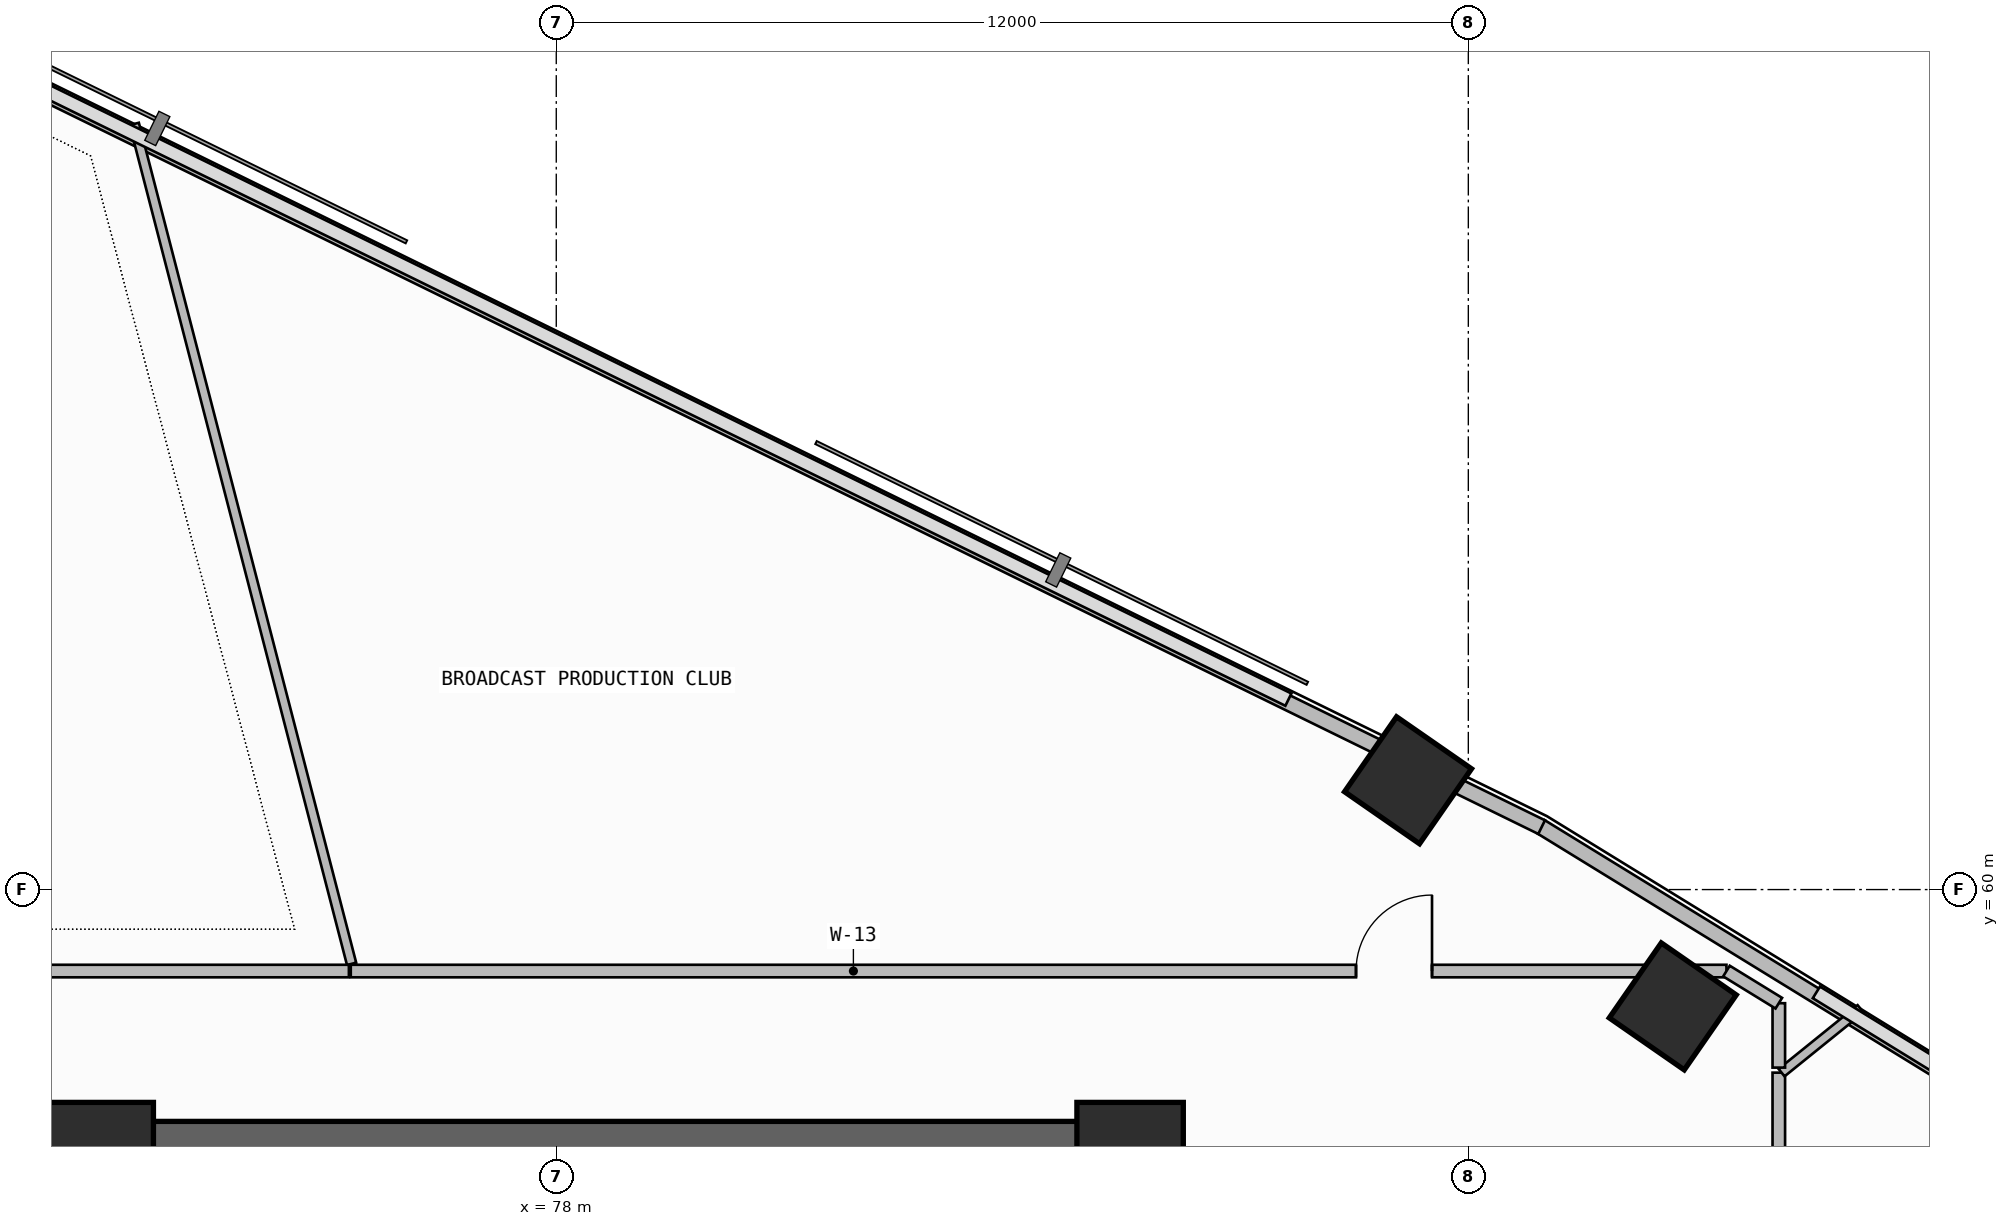
"""IFC4 building model, lengths in metres.
Left out: names, types, materials, properties, quantities, classifications, styles, units other than length and angle.
Written with IfcOpenShell. Run it as: python <this file> out.ifc"""

import sys

from ifc_helpers import new_model, si_unit, direction, frame, frame_2d, origin, origin_2d, place, context, subcontext, project, spatial, rectangle, extrude, element, fill, save


model = new_model("IFC4")
c1 = context("Model", 3, precision=1e-05, world=origin(), true_north=direction((0.0, 1.0)))
c2 = subcontext(c1, "Body", "Model", "MODEL_VIEW")
j1 = project(units=[si_unit("LENGTHUNIT", "METRE"), si_unit("PLANEANGLEUNIT", "RADIAN")], contexts=[c1])
p1 = place(None, origin())
s1 = spatial("IfcSite", under=j1, at=p1, CompositionType="ELEMENT")
p2 = place(p1, origin())
s2 = spatial("IfcBuilding", under=s1, at=p2, CompositionType="ELEMENT")
p3 = place(p2, frame((0.0, 0.0, 113.7)))
s3 = spatial("IfcBuildingStorey", under=s2, at=p3, CompositionType="ELEMENT", Elevation=113.7)
p4 = place(p3, frame((72.0, 56.5, -0.26), z_axis=(0.0, 0.0, 1.0), x_axis=(1.0, 0.0, 0.0)))
e1 = element("IfcWall", 1, at=p4, inside=s3, PredefinedType="SHEAR", context=c2, shape_type="SweptSolid", body=[
    extrude(rectangle(XDim=13.9, YDim=0.9, at=frame_2d((6.95, 0.0))), origin(), (0.0, 0.0, 1.0), 3.6),
])
for number, where, z_axis, x_axis in (
    (2, (72.0, 56.5, 0.0), (0.0, 0.0, 1.0), (1.0, 0.0, 0.0)),
    (3, (85.55, 56.5, 0.0), (0.0, 0.0, 1.0), (1.0, 0.0, 0.0)),
):
    element("IfcColumn", number, at=place(p3, frame(where, z_axis=z_axis, x_axis=x_axis)), inside=s3, PredefinedType="COLUMN", context=c2, shape_type="SweptSolid", body=[
        extrude(rectangle(XDim=1.4, YDim=1.4, at=origin_2d()), origin(), (0.0, 0.0, 1.0), 3.6),
    ])
for number, where, z_axis, x_axis in (
    (4, (92.69, 58.463, 0.0), (0.0, 0.0, 1.0), (0.57, 0.822, 0.0)),
    (5, (89.207, 61.438, 0.0), (0.0, 0.0, 1.0), (0.57, 0.822, 0.0)),
):
    element("IfcColumn", number, at=place(p3, frame(where, z_axis=z_axis, x_axis=x_axis)), inside=s3, PredefinedType="COLUMN", context=c2, shape_type="SweptSolid", body=[
        extrude(rectangle(XDim=1.2, YDim=1.2, at=origin_2d()), origin(), (0.0, 0.0, 1.0), 3.6),
    ])
p5 = place(p3, frame((119.865, 43.07, 0.0), z_axis=(0.0, 0.0, 1.0), x_axis=(-0.852110824326, 0.52336138859, 0.0)))
e6 = element("IfcWall", 6, at=p5, inside=s3, PredefinedType="PARAPET", context=c2, shape_type="SweptSolid", body=[
    extrude(rectangle(XDim=33.932, YDim=0.2, at=frame_2d((16.966, 0.0))), origin(), (0.0, 0.0, 1.0), 1.15),
])
p6 = place(p3, frame((90.964, 60.822, 0.0), z_axis=(0.0, 0.0, 1.0), x_axis=(-0.898000468284, 0.439994498787, 0.0)))
e7 = element("IfcWall", 7, at=p6, inside=s3, PredefinedType="PARAPET", context=c2, shape_type="SweptSolid", body=[
    extrude(rectangle(XDim=1.423, YDim=0.2, at=frame_2d((0.712, 0.0))), origin(), (0.0, 0.0, 1.0), 1.15),
])
p7 = place(p3, frame((88.921, 61.823, 0.0), z_axis=(0.0, 0.0, 1.0), x_axis=(-0.897993533426, 0.440008652103, 0.0)))
e8 = element("IfcWall", 8, at=p7, inside=s3, PredefinedType="PARAPET", context=c2, shape_type="SweptSolid", body=[
    extrude(rectangle(XDim=26.864, YDim=0.2, at=frame_2d((13.432, 0.0))), origin(), (0.0, 0.0, 1.0), 1.15),
])
p8 = place(p3, frame((94.085, 46.125, 0.0), z_axis=(0.0, 0.0, 1.0), x_axis=(0.0, 1.0, 0.0)))
e9 = element("IfcWall", 9, at=p8, inside=s3, PredefinedType="PARTITIONING", context=c2, shape_type="SweptSolid", body=[
    extrude(rectangle(XDim=11.467, YDim=0.165, at=frame_2d((5.733, 0.0))), origin(), (0.0, 0.0, 1.0), 2.725),
])
p9 = place(p8, frame((5.233, 0.0, 0.0)))
e10 = element("IfcOpeningElement", 10, at=p9, cuts=e9, PredefinedType="OPENING", context=c2, shape_type="SweptSolid", body=[
    extrude(rectangle(XDim=1.0, YDim=2.2, at=frame_2d((0.5, 1.1))), frame((0.0, 0.093, 0.0), z_axis=(0.0, -1.0, 0.0), x_axis=(1.0, 0.0, 0.0)), (0.0, 0.0, 1.0), 0.185),
])
p10 = place(p3, frame((94.122, 57.591, 0.0), z_axis=(0.0, 0.0, 1.0), x_axis=(0.777954919643, 0.628320095973, 0.0)))
e11 = element("IfcWall", 11, at=p10, inside=s3, PredefinedType="PARTITIONING", context=c2, shape_type="SweptSolid", body=[
    extrude(rectangle(XDim=1.336, YDim=0.125, at=frame_2d((0.668, 0.0))), origin(), (0.0, 0.0, 1.0), 3.34),
])
p11 = place(p3, frame((93.396, 58.928, 0.0), z_axis=(0.0, 0.0, 1.0), x_axis=(-1.0, 0.0, 0.0)))
e12 = element("IfcWall", 12, at=p11, inside=s3, PredefinedType="PARTITIONING", context=c2, shape_type="SweptSolid", body=[
    extrude(rectangle(XDim=18.1, YDim=0.165, at=frame_2d((9.05, 0.0))), origin(), (0.0, 0.0, 1.0), 2.725),
])
p12 = place(p11, frame((3.874, 0.0, 0.0)))
e13 = element("IfcOpeningElement", 13, at=p12, cuts=e12, PredefinedType="OPENING", context=c2, shape_type="SweptSolid", body=[
    extrude(rectangle(XDim=1.0, YDim=2.2, at=frame_2d((0.5, 1.1))), frame((0.0, 0.093, 0.0), z_axis=(0.0, -1.0, 0.0), x_axis=(1.0, 0.0, 0.0)), (0.0, 0.0, 1.0), 0.185),
])
p13 = place(p3, frame((94.085, 57.658, 0.0), z_axis=(0.0, 0.0, 1.0), x_axis=(0.0, 1.0, 0.0)))
e14 = element("IfcWall", 14, at=p13, inside=s3, PredefinedType="PARTITIONING", context=c2, shape_type="SweptSolid", body=[
    extrude(rectangle(XDim=0.847, YDim=0.165, at=frame_2d((0.424, 0.0))), origin(), (0.0, 0.0, 1.0), 3.34),
])
p14 = place(p3, frame((94.085, 58.505, 0.0), z_axis=(0.0, 0.0, 1.0), x_axis=(-0.852062515162, 0.523440035014, 0.0)))
e15 = element("IfcWall", 15, at=p14, inside=s3, PredefinedType="PARTITIONING", context=c2, shape_type="SweptSolid", body=[
    extrude(rectangle(XDim=0.808, YDim=0.165, at=frame_2d((0.404, 0.0))), origin(), (0.0, 0.0, 1.0), 3.34),
])
p15 = place(p3, frame((75.307, 59.022, 0.0), z_axis=(0.0, 0.0, 1.0), x_axis=(-0.250514518309, 0.968112842656, 0.0)))
e16 = element("IfcWall", 16, at=p15, inside=s3, PredefinedType="PARTITIONING", context=c2, shape_type="SweptSolid", body=[
    extrude(rectangle(XDim=11.414, YDim=0.125, at=frame_2d((5.707, 0.0))), origin(), (0.0, 0.0, 1.0), 3.34),
])
p16 = place(p3, frame((75.271, 58.928, 0.0), z_axis=(0.0, 0.0, 1.0), x_axis=(-1.0, 0.0, 0.0)))
e17 = element("IfcWall", 17, at=p16, inside=s3, PredefinedType="PARTITIONING", context=c2, shape_type="SweptSolid", body=[
    extrude(rectangle(XDim=5.812, YDim=0.165, at=frame_2d((2.906, 0.0))), origin(), (0.0, 0.0, 1.0), 2.725),
])
p17 = place(p12, frame((1.0, 0.0, 0.0), z_axis=(0.0, 0.0, 1.0), x_axis=(-1.0, 0.0, 0.0)))
e18 = element("IfcDoor", 18, at=p17, inside=s3, OperationType="SINGLE_SWING_RIGHT", PredefinedType="DOOR", context=c2, shape_type="SweptSolid", body=[
    extrude(rectangle(XDim=1.0, YDim=2.2, at=frame_2d((0.5, 1.1))), frame((0.0, 0.025, 0.0), z_axis=(0.0, -1.0, 0.0), x_axis=(1.0, 0.0, 0.0)), (0.0, 0.0, 1.0), 0.05),
])
fill(e13, e18)
save(model, sys.argv[1])
